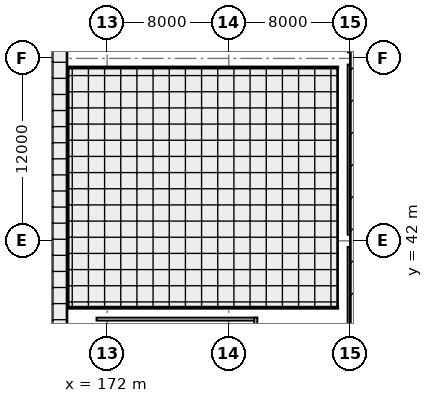
"""IFC4 building model, lengths in metres.
Left out: names, types, materials, properties, quantities, classifications, styles, units other than length and angle.
Written with IfcOpenShell. Run it as: python <this file> out.ifc"""

import sys

from ifc_helpers import new_model, si_unit, direction, frame, frame_2d, origin, origin_2d, place, context, subcontext, project, spatial, rectangle, extrude, element, fill, save


model = new_model("IFC4")
c1 = context("Model", 3, precision=1e-05, world=origin(), true_north=direction((0.0, 1.0)))
c2 = subcontext(c1, "Body", "Model", "MODEL_VIEW")
j1 = project(units=[si_unit("LENGTHUNIT", "METRE"), si_unit("PLANEANGLEUNIT", "RADIAN")], contexts=[c1])
p1 = place(None, origin())
s1 = spatial("IfcSite", under=j1, at=p1, CompositionType="ELEMENT")
p2 = place(p1, origin())
s2 = spatial("IfcBuilding", under=s1, at=p2, CompositionType="ELEMENT")
p3 = place(p2, origin())
s3 = spatial("IfcBuildingStorey", under=s2, at=p3, CompositionType="ELEMENT", Elevation=0.0)
for number, where, z_axis, x_axis in (
    (1, (172.0, 42.0, 0.0), (0.0, 0.0, 1.0), (1.0, 0.0, 0.0)),
    (2, (172.0, 54.0, 0.0), (0.0, 0.0, 1.0), (1.0, 0.0, 0.0)),
    (3, (180.0, 42.0, 0.0), (0.0, 0.0, 1.0), (1.0, 0.0, 0.0)),
    (4, (180.0, 54.0, 0.0), (0.0, 0.0, 1.0), (1.0, 0.0, 0.0)),
    (5, (188.0, 42.0, 0.0), (0.0, 0.0, 1.0), (1.0, 0.0, 0.0)),
    (6, (188.0, 54.0, 0.0), (0.0, 0.0, 1.0), (1.0, 0.0, 0.0)),
):
    element("IfcColumn", number, at=place(p3, frame(where, z_axis=z_axis, x_axis=x_axis)), inside=s3, PredefinedType="COLUMN", context=c2, shape_type="SweptSolid", body=[
        extrude(rectangle(XDim=0.8, YDim=0.8, at=origin_2d()), origin(), (0.0, 0.0, 1.0), 6.6),
    ])
p4 = place(p3, frame((188.0, 41.6, 0.0), z_axis=(0.0, 0.0, 1.0), x_axis=(0.0, -1.0, 0.0)))
e7 = element("IfcWall", 7, at=p4, inside=s3, PredefinedType="SOLIDWALL", context=c2, shape_type="SweptSolid", body=[
    extrude(rectangle(XDim=11.2, YDim=0.36, at=frame_2d((5.6, 0.0))), origin(), (0.0, 0.0, 1.0), 5.755),
])
p5 = place(p4, frame((2.867, 0.0, 0.0)))
e8 = element("IfcOpeningElement", 8, at=p5, cuts=e7, PredefinedType="OPENING", context=c2, shape_type="SweptSolid", body=[
    extrude(rectangle(XDim=2.0, YDim=2.4, at=frame_2d((1.0, 1.2))), frame((0.0, 0.19, 0.0), z_axis=(0.0, -1.0, 0.0), x_axis=(1.0, 0.0, 0.0)), (0.0, 0.0, 1.0), 0.38),
])
p6 = place(p4, frame((6.283, 0.0, 0.95)))
e9 = element("IfcOpeningElement", 9, at=p6, cuts=e7, PredefinedType="OPENING", context=c2, shape_type="SweptSolid", body=[
    extrude(rectangle(XDim=2.1, YDim=2.0, at=frame_2d((1.05, 1.0))), frame((0.0, 0.19, 0.0), z_axis=(0.0, -1.0, 0.0), x_axis=(1.0, 0.0, 0.0)), (0.0, 0.0, 1.0), 0.38),
])
p7 = place(p3, frame((188.0, 53.6, 0.0), z_axis=(0.0, 0.0, 1.0), x_axis=(0.0, -1.0, 0.0)))
e10 = element("IfcWall", 10, at=p7, inside=s3, PredefinedType="SOLIDWALL", context=c2, shape_type="SweptSolid", body=[
    extrude(rectangle(XDim=11.2, YDim=0.36, at=frame_2d((5.6, 0.0))), origin(), (0.0, 0.0, 1.0), 5.755),
])
p8 = place(p7, frame((2.967, 0.0, 0.95)))
e11 = element("IfcOpeningElement", 11, at=p8, cuts=e10, PredefinedType="OPENING", context=c2, shape_type="SweptSolid", body=[
    extrude(rectangle(XDim=1.8, YDim=2.0, at=frame_2d((0.9, 1.0))), frame((0.0, 0.19, 0.0), z_axis=(0.0, -1.0, 0.0), x_axis=(1.0, 0.0, 0.0)), (0.0, 0.0, 1.0), 0.38),
])
p9 = place(p7, frame((6.533, 0.0, 0.95)))
e12 = element("IfcOpeningElement", 12, at=p9, cuts=e10, PredefinedType="OPENING", context=c2, shape_type="SweptSolid", body=[
    extrude(rectangle(XDim=1.6, YDim=1.9, at=frame_2d((0.8, 0.95))), frame((0.0, 0.19, 0.0), z_axis=(0.0, -1.0, 0.0), x_axis=(1.0, 0.0, 0.0)), (0.0, 0.0, 1.0), 0.38),
])
p10 = place(p3, frame((188.0, 67.05, 0.0), z_axis=(0.0, 0.0, 1.0), x_axis=(0.0, -1.0, 0.0)))
e13 = element("IfcWall", 13, at=p10, inside=s3, PredefinedType="SOLIDWALL", context=c2, shape_type="SweptSolid", body=[
    extrude(rectangle(XDim=12.65, YDim=0.34, at=frame_2d((6.325, 0.0))), origin(), (0.0, 0.0, 1.0), 5.755),
])
p11 = place(p10, frame((4.2, 0.0, 0.0)))
e14 = element("IfcOpeningElement", 14, at=p11, cuts=e13, PredefinedType="OPENING", context=c2, shape_type="SweptSolid", body=[
    extrude(rectangle(XDim=4.2, YDim=3.4, at=frame_2d((2.1, 1.7))), frame((0.0, 0.18, 0.0), z_axis=(0.0, -1.0, 0.0), x_axis=(1.0, 0.0, 0.0)), (0.0, 0.0, 1.0), 0.36),
])
p12 = place(p3, frame((181.875, 36.85, 0.0), z_axis=(0.0, 0.0, 1.0), x_axis=(-1.0, 0.0, 0.0)))
e15 = element("IfcWall", 15, at=p12, inside=s3, PredefinedType="SOLIDWALL", context=c2, shape_type="SweptSolid", body=[
    extrude(rectangle(XDim=10.575, YDim=0.2, at=frame_2d((5.288, 0.0))), origin(), (0.0, 0.0, 1.0), 6.36),
])
p13 = place(p3, frame((181.775, 32.55, 0.0), z_axis=(0.0, 0.0, 1.0), x_axis=(0.0, 1.0, 0.0)))
e16 = element("IfcWall", 16, at=p13, inside=s3, PredefinedType="SOLIDWALL", context=c2, shape_type="SweptSolid", body=[
    extrude(rectangle(XDim=4.4, YDim=0.2, at=frame_2d((2.2, 0.0))), origin(), (0.0, 0.0, 1.0), 6.36),
])
for number, where, z_axis, x_axis in (
    (17, (187.2, 37.6, 0.0), (0.0, 0.0, 1.0), (-1.0, 0.0, 0.0)),
    (18, (169.4, 53.4, 0.0), (0.0, 0.0, 1.0), (1.0, 0.0, 0.0)),
):
    element("IfcWall", number, at=place(p3, frame(where, z_axis=z_axis, x_axis=x_axis)), inside=s3, PredefinedType="PARTITIONING", context=c2, shape_type="SweptSolid", body=[
        extrude(rectangle(XDim=17.8, YDim=0.13, at=frame_2d((8.9, 0.0))), origin(), (0.0, 0.0, 1.0), 4.4),
    ])
p14 = place(p3, frame((169.4, 37.6, 0.0), z_axis=(0.0, 0.0, 1.0), x_axis=(0.0, 1.0, 0.0)))
e19 = element("IfcWall", 19, at=p14, inside=s3, PredefinedType="PARTITIONING", context=c2, shape_type="SweptSolid", body=[
    extrude(rectangle(XDim=15.8, YDim=0.13, at=frame_2d((7.9, 0.0))), origin(), (0.0, 0.0, 1.0), 4.4),
])
p15 = place(p14, frame((7.125, 0.0, 0.0)))
e20 = element("IfcOpeningElement", 20, at=p15, cuts=e19, PredefinedType="OPENING", context=c2, shape_type="SweptSolid", body=[
    extrude(rectangle(XDim=1.55, YDim=2.1, at=frame_2d((0.775, 1.05))), frame((0.0, 0.075, 0.0), z_axis=(0.0, -1.0, 0.0), x_axis=(1.0, 0.0, 0.0)), (0.0, 0.0, 1.0), 0.15),
])
p16 = place(p14, frame((12.008, 0.0, 0.0)))
e21 = element("IfcOpeningElement", 21, at=p16, cuts=e19, PredefinedType="OPENING", context=c2, shape_type="SweptSolid", body=[
    extrude(rectangle(XDim=1.55, YDim=2.1, at=frame_2d((0.775, 1.05))), frame((0.0, 0.075, 0.0), z_axis=(0.0, -1.0, 0.0), x_axis=(1.0, 0.0, 0.0)), (0.0, 0.0, 1.0), 0.15),
])
p17 = place(p5, origin())
e22 = element("IfcDoor", 22, at=p17, inside=s3, OperationType="SINGLE_SWING_LEFT", PredefinedType="DOOR", context=c2, shape_type="SweptSolid", body=[
    extrude(rectangle(XDim=2.0, YDim=2.4, at=frame_2d((1.0, 1.2))), frame((0.0, 0.025, 0.0), z_axis=(0.0, -1.0, 0.0), x_axis=(1.0, 0.0, 0.0)), (0.0, 0.0, 1.0), 0.05),
])
fill(e8, e22)
p18 = place(p8, origin())
e23 = element("IfcWindow", 23, at=p18, inside=s3, PartitioningType="SINGLE_PANEL", PredefinedType="WINDOW", context=c2, shape_type="SweptSolid", body=[
    extrude(rectangle(XDim=1.8, YDim=2.0, at=frame_2d((0.9, 1.0))), frame((0.0, 0.03, 0.0), z_axis=(0.0, -1.0, 0.0), x_axis=(1.0, 0.0, 0.0)), (0.0, 0.0, 1.0), 0.06),
])
fill(e11, e23)
p19 = place(p9, origin())
e24 = element("IfcWindow", 24, at=p19, inside=s3, PartitioningType="SINGLE_PANEL", PredefinedType="WINDOW", context=c2, shape_type="SweptSolid", body=[
    extrude(rectangle(XDim=1.6, YDim=1.9, at=frame_2d((0.8, 0.95))), frame((0.0, 0.03, 0.0), z_axis=(0.0, -1.0, 0.0), x_axis=(1.0, 0.0, 0.0)), (0.0, 0.0, 1.0), 0.06),
])
fill(e12, e24)
p20 = place(p15, origin())
e25 = element("IfcDoor", 25, at=p20, inside=s3, OperationType="SINGLE_SWING_RIGHT", PredefinedType="DOOR", context=c2, shape_type="SweptSolid", body=[
    extrude(rectangle(XDim=1.55, YDim=2.1, at=frame_2d((0.775, 1.05))), frame((0.0, 0.025, 0.0), z_axis=(0.0, -1.0, 0.0), x_axis=(1.0, 0.0, 0.0)), (0.0, 0.0, 1.0), 0.05),
])
fill(e20, e25)
p21 = place(p16, origin())
e26 = element("IfcDoor", 26, at=p21, inside=s3, OperationType="SINGLE_SWING_LEFT", PredefinedType="DOOR", context=c2, shape_type="SweptSolid", body=[
    extrude(rectangle(XDim=1.55, YDim=2.1, at=frame_2d((0.775, 1.05))), frame((0.0, 0.025, 0.0), z_axis=(0.0, -1.0, 0.0), x_axis=(1.0, 0.0, 0.0)), (0.0, 0.0, 1.0), 0.05),
])
fill(e21, e26)
save(model, sys.argv[1])
